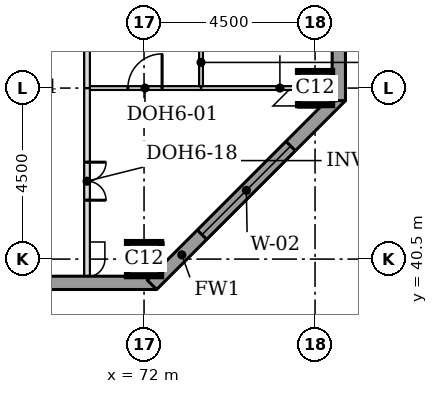
"""IFC4 building model, lengths in metres.
Left out: names, types, materials, properties, quantities, classifications, styles, units other than length and angle.
Written with IfcOpenShell. Run it as: python <this file> out.ifc"""

import sys

from ifc_helpers import new_model, si_unit, direction, frame, frame_2d, origin, origin_2d, place, context, subcontext, project, spatial, rectangle, extrude, element, fill, save


model = new_model("IFC4")
c1 = context("Model", 3, precision=1e-05, world=origin(), true_north=direction((0.0, 1.0)))
c2 = subcontext(c1, "Body", "Model", "MODEL_VIEW")
j1 = project(units=[si_unit("LENGTHUNIT", "METRE"), si_unit("PLANEANGLEUNIT", "RADIAN")], contexts=[c1])
p1 = place(None, origin())
s1 = spatial("IfcSite", under=j1, at=p1, CompositionType="ELEMENT")
p2 = place(p1, origin())
s2 = spatial("IfcBuilding", under=s1, at=p2, CompositionType="ELEMENT")
p3 = place(p2, frame((0.0, 0.0, 188.4)))
s3 = spatial("IfcBuildingStorey", under=s2, at=p3, CompositionType="ELEMENT", Elevation=188.4)
for number, where, z_axis, x_axis in (
    (1, (72.0, 40.5, 0.0), (0.0, 0.0, 1.0), (1.0, 0.0, 0.0)),
    (2, (76.5, 45.0, 0.0), (0.0, 0.0, 1.0), (1.0, 0.0, 0.0)),
):
    element("IfcColumn", number, at=place(p3, frame(where, z_axis=z_axis, x_axis=x_axis)), inside=s3, PredefinedType="COLUMN", context=c2, shape_type="SweptSolid", body=[
        extrude(rectangle(XDim=0.9, YDim=0.9, at=origin_2d()), origin(), (0.0, 0.0, 1.0), 3.7),
    ])
p4 = place(p3, frame((36.0, 39.875, 0.0), z_axis=(0.0, 0.0, 1.0), x_axis=(1.0, 0.0, 0.0)))
e3 = element("IfcWall", 3, at=p4, inside=s3, PredefinedType="STANDARD", context=c2, shape_type="SweptSolid", body=[
    extrude(rectangle(XDim=36.331, YDim=0.35, at=frame_2d((18.166, 0.0))), origin(), (0.0, 0.0, 1.0), 3.525),
])
p5 = place(p4, frame((5.1, 0.0, 0.9)))
e4 = element("IfcOpeningElement", 4, at=p5, cuts=e3, PredefinedType="OPENING", context=c2, shape_type="SweptSolid", body=[
    extrude(rectangle(XDim=3.3, YDim=1.9, at=frame_2d((1.65, 0.95))), frame((0.0, 0.185, 0.0), z_axis=(0.0, -1.0, 0.0), x_axis=(1.0, 0.0, 0.0)), (0.0, 0.0, 1.0), 0.37),
])
p6 = place(p4, frame((9.6, 0.0, 0.9)))
e5 = element("IfcOpeningElement", 5, at=p6, cuts=e3, PredefinedType="OPENING", context=c2, shape_type="SweptSolid", body=[
    extrude(rectangle(XDim=3.3, YDim=1.9, at=frame_2d((1.65, 0.95))), frame((0.0, 0.185, 0.0), z_axis=(0.0, -1.0, 0.0), x_axis=(1.0, 0.0, 0.0)), (0.0, 0.0, 1.0), 0.37),
])
p7 = place(p4, frame((14.1, 0.0, 0.9)))
e6 = element("IfcOpeningElement", 6, at=p7, cuts=e3, PredefinedType="OPENING", context=c2, shape_type="SweptSolid", body=[
    extrude(rectangle(XDim=3.3, YDim=1.9, at=frame_2d((1.65, 0.95))), frame((0.0, 0.185, 0.0), z_axis=(0.0, -1.0, 0.0), x_axis=(1.0, 0.0, 0.0)), (0.0, 0.0, 1.0), 0.37),
])
p8 = place(p4, frame((18.6, 0.0, 0.9)))
e7 = element("IfcOpeningElement", 7, at=p8, cuts=e3, PredefinedType="OPENING", context=c2, shape_type="SweptSolid", body=[
    extrude(rectangle(XDim=3.3, YDim=1.9, at=frame_2d((1.65, 0.95))), frame((0.0, 0.185, 0.0), z_axis=(0.0, -1.0, 0.0), x_axis=(1.0, 0.0, 0.0)), (0.0, 0.0, 1.0), 0.37),
])
p9 = place(p4, frame((23.1, 0.0, 0.9)))
e8 = element("IfcOpeningElement", 8, at=p9, cuts=e3, PredefinedType="OPENING", context=c2, shape_type="SweptSolid", body=[
    extrude(rectangle(XDim=3.3, YDim=1.9, at=frame_2d((1.65, 0.95))), frame((0.0, 0.185, 0.0), z_axis=(0.0, -1.0, 0.0), x_axis=(1.0, 0.0, 0.0)), (0.0, 0.0, 1.0), 0.37),
])
p10 = place(p4, frame((27.6, 0.0, 0.9)))
e9 = element("IfcOpeningElement", 9, at=p10, cuts=e3, PredefinedType="OPENING", context=c2, shape_type="SweptSolid", body=[
    extrude(rectangle(XDim=3.3, YDim=1.9, at=frame_2d((1.65, 0.95))), frame((0.0, 0.185, 0.0), z_axis=(0.0, -1.0, 0.0), x_axis=(1.0, 0.0, 0.0)), (0.0, 0.0, 1.0), 0.37),
])
p11 = place(p3, frame((72.208, 39.824, 0.0), z_axis=(0.0, 0.0, 1.0), x_axis=(0.707106781187, 0.707106781187, 0.0)))
e10 = element("IfcWall", 10, at=p11, inside=s3, PredefinedType="STANDARD", context=c2, shape_type="SweptSolid", body=[
    extrude(rectangle(XDim=7.027, YDim=0.35, at=frame_2d((3.513, 0.0))), origin(), (0.0, 0.0, 1.0), 3.525),
])
p12 = place(p11, frame((1.863, 0.0, 0.9)))
e11 = element("IfcOpeningElement", 11, at=p12, cuts=e10, PredefinedType="OPENING", context=c2, shape_type="SweptSolid", body=[
    extrude(rectangle(XDim=3.3, YDim=1.9, at=frame_2d((1.65, 0.95))), frame((0.0, 0.185, 0.0), z_axis=(0.0, -1.0, 0.0), x_axis=(1.0, 0.0, 0.0)), (0.0, 0.0, 1.0), 0.37),
])
p13 = place(p3, frame((77.125, 44.669, 0.0), z_axis=(0.0, 0.0, 1.0), x_axis=(0.0, 1.0, 0.0)))
e12 = element("IfcWall", 12, at=p13, inside=s3, PredefinedType="STANDARD", context=c2, shape_type="SweptSolid", body=[
    extrude(rectangle(XDim=32.163, YDim=0.35, at=frame_2d((16.081, 0.0))), origin(), (0.0, 0.0, 1.0), 3.525),
])
p14 = place(p13, frame((5.431, 0.0, 0.9)))
e13 = element("IfcOpeningElement", 13, at=p14, cuts=e12, PredefinedType="OPENING", context=c2, shape_type="SweptSolid", body=[
    extrude(rectangle(XDim=3.3, YDim=1.9, at=frame_2d((1.65, 0.95))), frame((0.0, 0.185, 0.0), z_axis=(0.0, -1.0, 0.0), x_axis=(1.0, 0.0, 0.0)), (0.0, 0.0, 1.0), 0.37),
])
p15 = place(p13, frame((9.931, 0.0, 0.9)))
e14 = element("IfcOpeningElement", 14, at=p15, cuts=e12, PredefinedType="OPENING", context=c2, shape_type="SweptSolid", body=[
    extrude(rectangle(XDim=3.3, YDim=1.9, at=frame_2d((1.65, 0.95))), frame((0.0, 0.185, 0.0), z_axis=(0.0, -1.0, 0.0), x_axis=(1.0, 0.0, 0.0)), (0.0, 0.0, 1.0), 0.37),
])
p16 = place(p13, frame((14.431, 0.0, 0.9)))
e15 = element("IfcOpeningElement", 15, at=p16, cuts=e12, PredefinedType="OPENING", context=c2, shape_type="SweptSolid", body=[
    extrude(rectangle(XDim=3.3, YDim=1.9, at=frame_2d((1.65, 0.95))), frame((0.0, 0.185, 0.0), z_axis=(0.0, -1.0, 0.0), x_axis=(1.0, 0.0, 0.0)), (0.0, 0.0, 1.0), 0.37),
])
p17 = place(p13, frame((18.931, 0.0, 0.9)))
e16 = element("IfcOpeningElement", 16, at=p17, cuts=e12, PredefinedType="OPENING", context=c2, shape_type="SweptSolid", body=[
    extrude(rectangle(XDim=3.3, YDim=1.9, at=frame_2d((1.65, 0.95))), frame((0.0, 0.185, 0.0), z_axis=(0.0, -1.0, 0.0), x_axis=(1.0, 0.0, 0.0)), (0.0, 0.0, 1.0), 0.37),
])
p18 = place(p13, frame((23.431, 0.0, 0.9)))
e17 = element("IfcOpeningElement", 17, at=p18, cuts=e12, PredefinedType="OPENING", context=c2, shape_type="SweptSolid", body=[
    extrude(rectangle(XDim=3.3, YDim=1.9, at=frame_2d((1.65, 0.95))), frame((0.0, 0.185, 0.0), z_axis=(0.0, -1.0, 0.0), x_axis=(1.0, 0.0, 0.0)), (0.0, 0.0, 1.0), 0.37),
])
p19 = place(p3, frame((70.575, 45.0, 0.0), z_axis=(0.0, 0.0, 1.0), x_axis=(1.0, 0.0, 0.0)))
e18 = element("IfcWall", 18, at=p19, inside=s3, PredefinedType="PARTITIONING", context=c2, shape_type="SweptSolid", body=[
    extrude(rectangle(XDim=2.925, YDim=0.1, at=frame_2d((1.462, 0.0))), origin(), (0.0, 0.0, 1.0), 3.096),
])
p20 = place(p19, frame((1.0, 0.0, 0.0)))
e19 = element("IfcOpeningElement", 19, at=p20, cuts=e18, PredefinedType="OPENING", context=c2, shape_type="SweptSolid", body=[
    extrude(rectangle(XDim=0.9, YDim=2.1, at=frame_2d((0.45, 1.05))), frame((0.0, 0.06, 0.0), z_axis=(0.0, -1.0, 0.0), x_axis=(1.0, 0.0, 0.0)), (0.0, 0.0, 1.0), 0.12),
])
p21 = place(p3, frame((73.5, 45.0, 0.0), z_axis=(0.0, 0.0, 1.0), x_axis=(1.0, 0.0, 0.0)))
e20 = element("IfcWall", 20, at=p21, inside=s3, PredefinedType="PARTITIONING", context=c2, shape_type="SweptSolid", body=[
    extrude(rectangle(XDim=2.55, YDim=0.1, at=frame_2d((1.275, 0.0))), origin(), (0.0, 0.0, 1.0), 3.096),
])
p22 = place(p3, frame((70.5, 40.05, 0.0), z_axis=(0.0, 0.0, 1.0), x_axis=(0.0, 1.0, 0.0)))
e21 = element("IfcWall", 21, at=p22, inside=s3, PredefinedType="PARTITIONING", context=c2, shape_type="SweptSolid", body=[
    extrude(rectangle(XDim=4.95, YDim=0.15, at=frame_2d((2.475, 0.0))), origin(), (0.0, 0.0, 1.0), 3.55),
])
p23 = place(p22, frame((2.0, 0.0, 0.0)))
e22 = element("IfcOpeningElement", 22, at=p23, cuts=e21, PredefinedType="OPENING", context=c2, shape_type="SweptSolid", body=[
    extrude(rectangle(XDim=1.0, YDim=2.1, at=frame_2d((0.5, 1.05))), frame((0.0, 0.085, 0.0), z_axis=(0.0, -1.0, 0.0), x_axis=(1.0, 0.0, 0.0)), (0.0, 0.0, 1.0), 0.17),
])
p24 = place(p3, frame((70.5, 45.0, 0.0), z_axis=(0.0, 0.0, 1.0), x_axis=(0.0, 1.0, 0.0)))
e23 = element("IfcWall", 23, at=p24, inside=s3, PredefinedType="PARTITIONING", context=c2, shape_type="SweptSolid", body=[
    extrude(rectangle(XDim=21.0, YDim=0.15, at=frame_2d((10.5, 0.0))), origin(), (0.0, 0.0, 1.0), 3.55),
])
p25 = place(p3, frame((73.5, 45.05, 0.0), z_axis=(0.0, 0.0, 1.0), x_axis=(0.0, 1.0, 0.0)))
e24 = element("IfcWall", 24, at=p25, inside=s3, PredefinedType="PARTITIONING", context=c2, shape_type="SweptSolid", body=[
    extrude(rectangle(XDim=4.45, YDim=0.1, at=frame_2d((2.225, 0.0))), origin(), (0.0, 0.0, 1.0), 3.55),
])
p26 = place(p25, frame((1.8, 0.0, 0.0)))
e25 = element("IfcOpeningElement", 25, at=p26, cuts=e24, PredefinedType="OPENING", context=c2, shape_type="SweptSolid", body=[
    extrude(rectangle(XDim=0.9, YDim=2.1, at=frame_2d((0.45, 1.05))), frame((0.0, 0.06, 0.0), z_axis=(0.0, -1.0, 0.0), x_axis=(1.0, 0.0, 0.0)), (0.0, 0.0, 1.0), 0.12),
])
p27 = place(p12, origin())
e26 = element("IfcWindow", 26, at=p27, inside=s3, PartitioningType="SINGLE_PANEL", PredefinedType="WINDOW", context=c2, shape_type="SweptSolid", body=[
    extrude(rectangle(XDim=3.3, YDim=1.9, at=frame_2d((1.65, 0.95))), frame((0.0, 0.085, 0.0), z_axis=(0.0, -1.0, 0.0), x_axis=(1.0, 0.0, 0.0)), (0.0, 0.0, 1.0), 0.06),
])
fill(e11, e26)
p28 = place(p23, frame((1.0, 0.0, 0.0), z_axis=(0.0, 0.0, 1.0), x_axis=(-1.0, 0.0, 0.0)))
e27 = element("IfcDoor", 27, at=p28, inside=s3, OperationType="DOUBLE_DOOR_SINGLE_SWING", PredefinedType="DOOR", context=c2, shape_type="SweptSolid", body=[
    extrude(rectangle(XDim=1.0, YDim=2.1, at=frame_2d((0.5, 1.05))), frame((0.0, 0.025, 0.0), z_axis=(0.0, -1.0, 0.0), x_axis=(1.0, 0.0, 0.0)), (0.0, 0.0, 1.0), 0.05),
])
fill(e22, e27)
p29 = place(p20, origin())
e28 = element("IfcDoor", 28, at=p29, inside=s3, OperationType="SINGLE_SWING_RIGHT", PredefinedType="DOOR", context=c2, shape_type="SweptSolid", body=[
    extrude(rectangle(XDim=0.9, YDim=2.1, at=frame_2d((0.45, 1.05))), frame((0.0, 0.025, 0.0), z_axis=(0.0, -1.0, 0.0), x_axis=(1.0, 0.0, 0.0)), (0.0, 0.0, 1.0), 0.05),
])
fill(e19, e28)
save(model, sys.argv[1])
